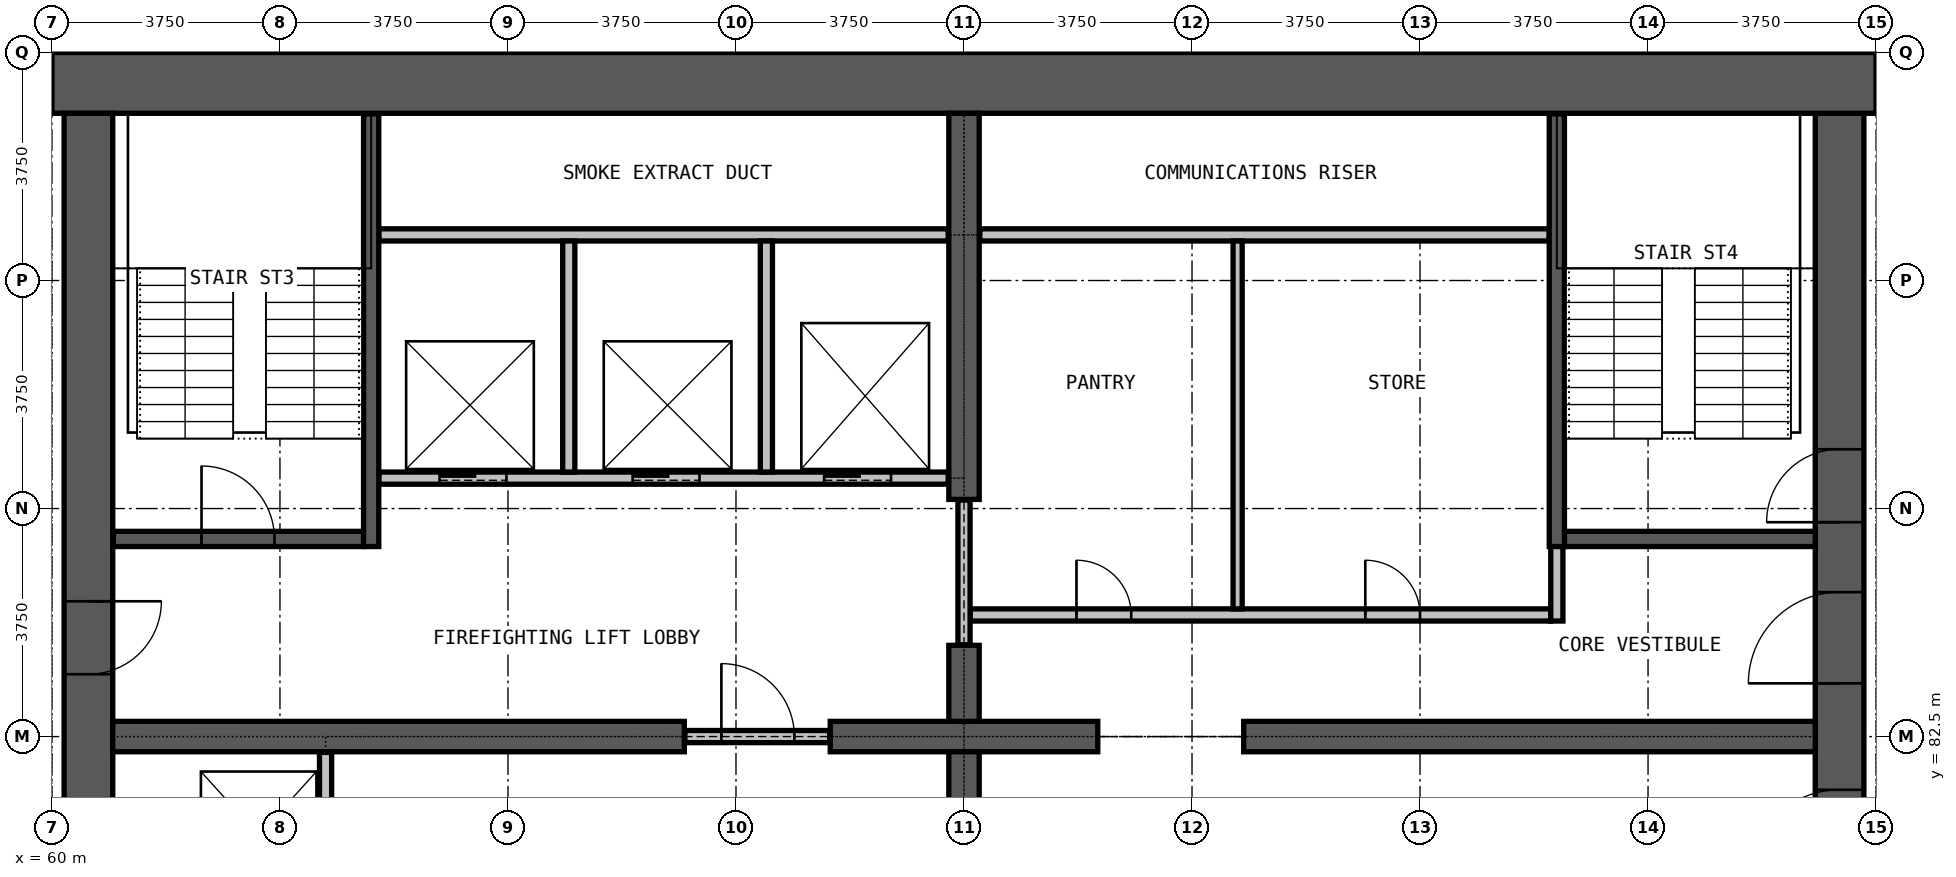
"""IFC4 building model, lengths in metres.
Left out: names, types, materials, properties, quantities, classifications, styles, units other than length and angle.
Written with IfcOpenShell. Run it as: python <this file> out.ifc"""

import sys

from ifc_helpers import new_model, si_unit, direction, frame, frame_2d, origin, place, context, subcontext, project, spatial, rectangle, extrude, element, fill, save


model = new_model("IFC4")
c1 = context("Model", 3, precision=1e-05, world=origin(), true_north=direction((0.0, 1.0)))
c2 = subcontext(c1, "Body", "Model", "MODEL_VIEW")
j1 = project(units=[si_unit("LENGTHUNIT", "METRE"), si_unit("PLANEANGLEUNIT", "RADIAN")], contexts=[c1])
p1 = place(None, origin())
s1 = spatial("IfcSite", under=j1, at=p1, CompositionType="ELEMENT")
p2 = place(p1, origin())
s2 = spatial("IfcBuilding", under=s1, at=p2, CompositionType="ELEMENT")
p3 = place(p2, frame((0.0, 0.0, 136.0)))
s3 = spatial("IfcBuildingStorey", under=s2, at=p3, CompositionType="ELEMENT", Elevation=136.0)
p4 = place(p3, frame((89.4, 72.25, 0.0), z_axis=(0.0, 0.0, 1.0), x_axis=(0.0, 1.0, 0.0)))
e1 = element("IfcWall", 1, at=p4, inside=s3, PredefinedType="SHEAR", context=c2, shape_type="SweptSolid", body=[
    extrude(rectangle(XDim=20.5, YDim=0.8, at=frame_2d((10.25, 0.0))), origin(), (0.0, 0.0, 1.0), 3.6),
])
p5 = place(p4, frame((0.275, 0.0, 0.0)))
e2 = element("IfcOpeningElement", 2, at=p5, cuts=e1, PredefinedType="OPENING", context=c2, shape_type="SweptSolid", body=[
    extrude(rectangle(XDim=1.2, YDim=2.2, at=frame_2d((0.6, 1.1))), frame((0.0, 0.41, 0.0), z_axis=(0.0, -1.0, 0.0), x_axis=(1.0, 0.0, 0.0)), (0.0, 0.0, 1.0), 0.82),
])
p6 = place(p4, frame((13.775, 0.0, 0.0)))
e3 = element("IfcOpeningElement", 3, at=p6, cuts=e1, PredefinedType="OPENING", context=c2, shape_type="SweptSolid", body=[
    extrude(rectangle(XDim=1.2, YDim=2.2, at=frame_2d((0.6, 1.1))), frame((0.0, 0.41, 0.0), z_axis=(0.0, -1.0, 0.0), x_axis=(1.0, 0.0, 0.0)), (0.0, 0.0, 1.0), 0.82),
])
p7 = place(p4, frame((7.875, 0.0, 0.0)))
e4 = element("IfcOpeningElement", 4, at=p7, cuts=e1, PredefinedType="OPENING", context=c2, shape_type="SweptSolid", body=[
    extrude(rectangle(XDim=1.5, YDim=2.2, at=frame_2d((0.75, 1.1))), frame((0.0, 0.41, 0.0), z_axis=(0.0, -1.0, 0.0), x_axis=(1.0, 0.0, 0.0)), (0.0, 0.0, 1.0), 0.82),
])
p8 = place(p4, frame((11.125, 0.0, 0.0)))
e5 = element("IfcOpeningElement", 5, at=p8, cuts=e1, PredefinedType="OPENING", context=c2, shape_type="SweptSolid", body=[
    extrude(rectangle(XDim=1.5, YDim=2.2, at=frame_2d((0.75, 1.1))), frame((0.0, 0.41, 0.0), z_axis=(0.0, -1.0, 0.0), x_axis=(1.0, 0.0, 0.0)), (0.0, 0.0, 1.0), 0.82),
])
p9 = place(p3, frame((90.0, 93.25, 0.0), z_axis=(0.0, 0.0, 1.0), x_axis=(-1.0, 0.0, 0.0)))
e6 = element("IfcWall", 6, at=p9, inside=s3, PredefinedType="SHEAR", context=c2, shape_type="SweptSolid", body=[
    extrude(rectangle(XDim=30.0, YDim=1.0, at=frame_2d((15.0, 0.0))), origin(), (0.0, 0.0, 1.0), 3.6),
])
p10 = place(p3, frame((60.6, 92.75, 0.0), z_axis=(0.0, 0.0, 1.0), x_axis=(0.0, -1.0, 0.0)))
e7 = element("IfcWall", 7, at=p10, inside=s3, PredefinedType="SHEAR", context=c2, shape_type="SweptSolid", body=[
    extrude(rectangle(XDim=20.5, YDim=0.8, at=frame_2d((10.25, 0.0))), origin(), (0.0, 0.0, 1.0), 3.6),
])
p11 = place(p10, frame((19.025, 0.0, 0.0)))
e8 = element("IfcOpeningElement", 8, at=p11, cuts=e7, PredefinedType="OPENING", context=c2, shape_type="SweptSolid", body=[
    extrude(rectangle(XDim=1.2, YDim=2.2, at=frame_2d((0.6, 1.1))), frame((0.0, 0.41, 0.0), z_axis=(0.0, -1.0, 0.0), x_axis=(1.0, 0.0, 0.0)), (0.0, 0.0, 1.0), 0.82),
])
p12 = place(p10, frame((8.025, 0.0, 0.0)))
e9 = element("IfcOpeningElement", 9, at=p12, cuts=e7, PredefinedType="OPENING", context=c2, shape_type="SweptSolid", body=[
    extrude(rectangle(XDim=1.2, YDim=2.2, at=frame_2d((0.6, 1.1))), frame((0.0, 0.41, 0.0), z_axis=(0.0, -1.0, 0.0), x_axis=(1.0, 0.0, 0.0)), (0.0, 0.0, 1.0), 0.82),
])
p13 = place(p3, frame((61.0, 82.5, 0.0), z_axis=(0.0, 0.0, 1.0), x_axis=(1.0, 0.0, 0.0)))
e10 = element("IfcWall", 10, at=p13, inside=s3, PredefinedType="SHEAR", context=c2, shape_type="SweptSolid", body=[
    extrude(rectangle(XDim=9.4, YDim=0.5, at=frame_2d((4.7, 0.0))), origin(), (0.0, 0.0, 1.0), 3.6),
])
p14 = place(p3, frame((72.8, 82.5, 0.0), z_axis=(0.0, 0.0, 1.0), x_axis=(1.0, 0.0, 0.0)))
e11 = element("IfcWall", 11, at=p14, inside=s3, PredefinedType="SHEAR", context=c2, shape_type="SweptSolid", body=[
    extrude(rectangle(XDim=4.4, YDim=0.5, at=frame_2d((2.2, 0.0))), origin(), (0.0, 0.0, 1.0), 3.6),
])
p15 = place(p3, frame((79.6, 82.5, 0.0), z_axis=(0.0, 0.0, 1.0), x_axis=(1.0, 0.0, 0.0)))
e12 = element("IfcWall", 12, at=p15, inside=s3, PredefinedType="SHEAR", context=c2, shape_type="SweptSolid", body=[
    extrude(rectangle(XDim=9.4, YDim=0.5, at=frame_2d((4.7, 0.0))), origin(), (0.0, 0.0, 1.0), 3.6),
])
for number, where, z_axis, x_axis in (
    (13, (75.0, 81.0, 0.0), (0.0, 0.0, 1.0), (0.0, 1.0, 0.0)),
    (14, (75.0, 82.75, 0.0), (0.0, 0.0, 1.0), (0.0, 1.0, 0.0)),
):
    element("IfcWall", number, at=place(p3, frame(where, z_axis=z_axis, x_axis=x_axis)), inside=s3, PredefinedType="SHEAR", context=c2, shape_type="SweptSolid", body=[
        extrude(rectangle(XDim=1.25, YDim=0.5, at=frame_2d((0.625, 0.0))), origin(), (0.0, 0.0, 1.0), 3.6),
    ])
p16 = place(p3, frame((75.0, 86.4, 0.0), z_axis=(0.0, 0.0, 1.0), x_axis=(0.0, 1.0, 0.0)))
e15 = element("IfcWall", 15, at=p16, inside=s3, PredefinedType="SHEAR", context=c2, shape_type="SweptSolid", body=[
    extrude(rectangle(XDim=6.35, YDim=0.5, at=frame_2d((3.175, 0.0))), origin(), (0.0, 0.0, 1.0), 3.6),
])
p17 = place(p3, frame((70.41, 82.5, 0.0), z_axis=(0.0, 0.0, 1.0), x_axis=(1.0, 0.0, 0.0)))
e16 = element("IfcWall", 16, at=p17, inside=s3, PredefinedType="PARTITIONING", context=c2, shape_type="SweptSolid", body=[
    extrude(rectangle(XDim=2.38, YDim=0.2, at=frame_2d((1.19, 0.0))), origin(), (0.0, 0.0, 1.0), 2.4),
])
p18 = place(p17, frame((0.6, 0.0, 0.0)))
e17 = element("IfcOpeningElement", 17, at=p18, cuts=e16, PredefinedType="OPENING", context=c2, shape_type="SweptSolid", body=[
    extrude(rectangle(XDim=1.2, YDim=2.2, at=frame_2d((0.6, 1.1))), frame((0.0, 0.11, 0.0), z_axis=(0.0, -1.0, 0.0), x_axis=(1.0, 0.0, 0.0)), (0.0, 0.0, 1.0), 0.22),
])
p19 = place(p3, frame((75.1, 84.5, 0.0), z_axis=(0.0, 0.0, 1.0), x_axis=(1.0, 0.0, 0.0)))
e18 = element("IfcWall", 18, at=p19, inside=s3, PredefinedType="PARTITIONING", context=c2, shape_type="SweptSolid", body=[
    extrude(rectangle(XDim=9.55, YDim=0.2, at=frame_2d((4.775, 0.0))), origin(), (0.0, 0.0, 1.0), 3.3),
])
p20 = place(p19, frame((1.75, 0.0, 0.0)))
e19 = element("IfcOpeningElement", 19, at=p20, cuts=e18, PredefinedType="OPENING", context=c2, shape_type="SweptSolid", body=[
    extrude(rectangle(XDim=0.9, YDim=2.2, at=frame_2d((0.45, 1.1))), frame((0.0, 0.11, 0.0), z_axis=(0.0, -1.0, 0.0), x_axis=(1.0, 0.0, 0.0)), (0.0, 0.0, 1.0), 0.22),
])
p21 = place(p19, frame((6.5, 0.0, 0.0)))
e20 = element("IfcOpeningElement", 20, at=p21, cuts=e18, PredefinedType="OPENING", context=c2, shape_type="SweptSolid", body=[
    extrude(rectangle(XDim=0.9, YDim=2.2, at=frame_2d((0.45, 1.1))), frame((0.0, 0.11, 0.0), z_axis=(0.0, -1.0, 0.0), x_axis=(1.0, 0.0, 0.0)), (0.0, 0.0, 1.0), 0.22),
])
p22 = place(p3, frame((75.26, 90.75, 0.0), z_axis=(0.0, 0.0, 1.0), x_axis=(1.0, 0.0, 0.0)))
e21 = element("IfcWall", 21, at=p22, inside=s3, PredefinedType="PARTITIONING", context=c2, shape_type="SweptSolid", body=[
    extrude(rectangle(XDim=9.365, YDim=0.2, at=frame_2d((4.683, 0.0))), origin(), (0.0, 0.0, 1.0), 3.3),
])
p23 = place(p3, frame((75.0, 84.01, 0.0), z_axis=(0.0, 0.0, 1.0), x_axis=(0.0, 1.0, 0.0)))
e22 = element("IfcWall", 22, at=p23, inside=s3, PredefinedType="PARTITIONING", context=c2, shape_type="SweptSolid", body=[
    extrude(rectangle(XDim=2.38, YDim=0.2, at=frame_2d((1.19, 0.0))), origin(), (0.0, 0.0, 1.0), 2.4),
])
p24 = place(p3, frame((84.75, 84.4, 0.0), z_axis=(0.0, 0.0, 1.0), x_axis=(0.0, 1.0, 0.0)))
e23 = element("IfcWall", 23, at=p24, inside=s3, PredefinedType="PARTITIONING", context=c2, shape_type="SweptSolid", body=[
    extrude(rectangle(XDim=1.475, YDim=0.2, at=frame_2d((0.738, 0.0))), origin(), (0.0, 0.0, 1.0), 3.3),
])
p25 = place(p3, frame((79.5, 84.6, 0.0), z_axis=(0.0, 0.0, 1.0), x_axis=(0.0, 1.0, 0.0)))
e24 = element("IfcWall", 24, at=p25, inside=s3, PredefinedType="PARTITIONING", context=c2, shape_type="SweptSolid", body=[
    extrude(rectangle(XDim=6.05, YDim=0.15, at=frame_2d((3.025, 0.0))), origin(), (0.0, 0.0, 1.0), 3.3),
])
p26 = place(p3, frame((65.375, 86.75, 0.0), z_axis=(0.0, 0.0, 1.0), x_axis=(1.0, 0.0, 0.0)))
e25 = element("IfcWall", 25, at=p26, inside=s3, PredefinedType="PARTITIONING", context=c2, shape_type="SweptSolid", body=[
    extrude(rectangle(XDim=9.365, YDim=0.2, at=frame_2d((4.683, 0.0))), origin(), (0.0, 0.0, 1.0), 3.3),
])
p27 = place(p26, frame((1.0, 0.0, 0.0)))
e26 = element("IfcOpeningElement", 26, at=p27, cuts=e25, PredefinedType="OPENING", context=c2, shape_type="SweptSolid", body=[
    extrude(rectangle(XDim=1.1, YDim=2.2, at=frame_2d((0.55, 1.1))), frame((0.0, 0.11, 0.0), z_axis=(0.0, -1.0, 0.0), x_axis=(1.0, 0.0, 0.0)), (0.0, 0.0, 1.0), 0.22),
])
p28 = place(p26, frame((4.175, 0.0, 0.0)))
e27 = element("IfcOpeningElement", 27, at=p28, cuts=e25, PredefinedType="OPENING", context=c2, shape_type="SweptSolid", body=[
    extrude(rectangle(XDim=1.1, YDim=2.2, at=frame_2d((0.55, 1.1))), frame((0.0, 0.11, 0.0), z_axis=(0.0, -1.0, 0.0), x_axis=(1.0, 0.0, 0.0)), (0.0, 0.0, 1.0), 0.22),
])
p29 = place(p26, frame((7.325, 0.0, 0.0)))
e28 = element("IfcOpeningElement", 28, at=p29, cuts=e25, PredefinedType="OPENING", context=c2, shape_type="SweptSolid", body=[
    extrude(rectangle(XDim=1.1, YDim=2.2, at=frame_2d((0.55, 1.1))), frame((0.0, 0.11, 0.0), z_axis=(0.0, -1.0, 0.0), x_axis=(1.0, 0.0, 0.0)), (0.0, 0.0, 1.0), 0.22),
])
p30 = place(p3, frame((65.375, 90.75, 0.0), z_axis=(0.0, 0.0, 1.0), x_axis=(1.0, 0.0, 0.0)))
e29 = element("IfcWall", 29, at=p30, inside=s3, PredefinedType="PARTITIONING", context=c2, shape_type="SweptSolid", body=[
    extrude(rectangle(XDim=9.365, YDim=0.2, at=frame_2d((4.683, 0.0))), origin(), (0.0, 0.0, 1.0), 3.3),
])
p31 = place(p3, frame((64.5, 79.375, 0.0), z_axis=(0.0, 0.0, 1.0), x_axis=(0.0, 1.0, 0.0)))
e30 = element("IfcWall", 30, at=p31, inside=s3, PredefinedType="PARTITIONING", context=c2, shape_type="SweptSolid", body=[
    extrude(rectangle(XDim=2.865, YDim=0.2, at=frame_2d((1.433, 0.0))), origin(), (0.0, 0.0, 1.0), 3.3),
])
for number, where, z_axis, x_axis in (
    (31, (68.5, 86.85, 0.0), (0.0, 0.0, 1.0), (0.0, 1.0, 0.0)),
    (32, (71.75, 86.85, 0.0), (0.0, 0.0, 1.0), (0.0, 1.0, 0.0)),
):
    element("IfcWall", number, at=place(p3, frame(where, z_axis=z_axis, x_axis=x_axis)), inside=s3, PredefinedType="PARTITIONING", context=c2, shape_type="SweptSolid", body=[
        extrude(rectangle(XDim=3.8, YDim=0.2, at=frame_2d((1.9, 0.0))), origin(), (0.0, 0.0, 1.0), 3.3),
    ])
p32 = place(p3, frame((61.01, 85.75, 0.0), z_axis=(0.0, 0.0, 1.0), x_axis=(1.0, 0.0, 0.0)))
e33 = element("IfcWall", 33, at=p32, inside=s3, PredefinedType="PARTITIONING", context=c2, shape_type="SweptSolid", body=[
    extrude(rectangle(XDim=4.115, YDim=0.25, at=frame_2d((2.058, 0.0))), origin(), (0.0, 0.0, 1.0), 3.3),
])
p33 = place(p32, frame((1.45, 0.0, 0.0)))
e34 = element("IfcOpeningElement", 34, at=p33, cuts=e33, PredefinedType="OPENING", context=c2, shape_type="SweptSolid", body=[
    extrude(rectangle(XDim=1.2, YDim=2.2, at=frame_2d((0.6, 1.1))), frame((0.0, 0.135, 0.0), z_axis=(0.0, -1.0, 0.0), x_axis=(1.0, 0.0, 0.0)), (0.0, 0.0, 1.0), 0.27),
])
p34 = place(p3, frame((84.875, 85.75, 0.0), z_axis=(0.0, 0.0, 1.0), x_axis=(1.0, 0.0, 0.0)))
e35 = element("IfcWall", 35, at=p34, inside=s3, PredefinedType="PARTITIONING", context=c2, shape_type="SweptSolid", body=[
    extrude(rectangle(XDim=4.125, YDim=0.25, at=frame_2d((2.062, 0.0))), origin(), (0.0, 0.0, 1.0), 3.3),
])
for number, where, z_axis, x_axis in (
    (36, (65.25, 85.625, 0.0), (0.0, 0.0, 1.0), (0.0, 1.0, 0.0)),
    (37, (84.75, 85.625, 0.0), (0.0, 0.0, 1.0), (0.0, 1.0, 0.0)),
):
    element("IfcWall", number, at=place(p3, frame(where, z_axis=z_axis, x_axis=x_axis)), inside=s3, PredefinedType="PARTITIONING", context=c2, shape_type="SweptSolid", body=[
        extrude(rectangle(XDim=7.115, YDim=0.25, at=frame_2d((3.558, 0.0))), origin(), (0.0, 0.0, 1.0), 3.3),
    ])
p35 = place(p27, origin())
e38 = element("IfcDoor", 38, at=p35, inside=s3, OperationType="DOUBLE_DOOR_SLIDING", PredefinedType="DOOR", context=c2, shape_type="SweptSolid", body=[
    extrude(rectangle(XDim=1.1, YDim=2.2, at=frame_2d((0.55, 1.1))), frame((0.0, 0.025, 0.0), z_axis=(0.0, -1.0, 0.0), x_axis=(1.0, 0.0, 0.0)), (0.0, 0.0, 1.0), 0.05),
])
fill(e26, e38)
p36 = place(p28, origin())
e39 = element("IfcDoor", 39, at=p36, inside=s3, OperationType="DOUBLE_DOOR_SLIDING", PredefinedType="DOOR", context=c2, shape_type="SweptSolid", body=[
    extrude(rectangle(XDim=1.1, YDim=2.2, at=frame_2d((0.55, 1.1))), frame((0.0, 0.025, 0.0), z_axis=(0.0, -1.0, 0.0), x_axis=(1.0, 0.0, 0.0)), (0.0, 0.0, 1.0), 0.05),
])
fill(e27, e39)
p37 = place(p29, origin())
e40 = element("IfcDoor", 40, at=p37, inside=s3, OperationType="DOUBLE_DOOR_SLIDING", PredefinedType="DOOR", context=c2, shape_type="SweptSolid", body=[
    extrude(rectangle(XDim=1.1, YDim=2.2, at=frame_2d((0.55, 1.1))), frame((0.0, 0.025, 0.0), z_axis=(0.0, -1.0, 0.0), x_axis=(1.0, 0.0, 0.0)), (0.0, 0.0, 1.0), 0.05),
])
fill(e28, e40)
p38 = place(p18, origin())
e41 = element("IfcDoor", 41, at=p38, inside=s3, OperationType="SINGLE_SWING_LEFT", PredefinedType="DOOR", context=c2, shape_type="SweptSolid", body=[
    extrude(rectangle(XDim=1.2, YDim=2.2, at=frame_2d((0.6, 1.1))), frame((0.0, 0.025, 0.0), z_axis=(0.0, -1.0, 0.0), x_axis=(1.0, 0.0, 0.0)), (0.0, 0.0, 1.0), 0.05),
])
fill(e17, e41)
p39 = place(p33, origin())
e42 = element("IfcDoor", 42, at=p39, inside=s3, OperationType="SINGLE_SWING_LEFT", PredefinedType="DOOR", context=c2, shape_type="SweptSolid", body=[
    extrude(rectangle(XDim=1.2, YDim=2.2, at=frame_2d((0.6, 1.1))), frame((0.0, 0.025, 0.0), z_axis=(0.0, -1.0, 0.0), x_axis=(1.0, 0.0, 0.0)), (0.0, 0.0, 1.0), 0.05),
])
fill(e34, e42)
p40 = place(p6, origin())
e43 = element("IfcDoor", 43, at=p40, inside=s3, OperationType="SINGLE_SWING_RIGHT", PredefinedType="DOOR", context=c2, shape_type="SweptSolid", body=[
    extrude(rectangle(XDim=1.2, YDim=2.2, at=frame_2d((0.6, 1.1))), frame((0.0, 0.025, 0.0), z_axis=(0.0, -1.0, 0.0), x_axis=(1.0, 0.0, 0.0)), (0.0, 0.0, 1.0), 0.05),
])
fill(e3, e43)
p41 = place(p7, origin())
e44 = element("IfcDoor", 44, at=p41, inside=s3, OperationType="DOUBLE_DOOR_SINGLE_SWING", PredefinedType="DOOR", context=c2, shape_type="SweptSolid", body=[
    extrude(rectangle(XDim=1.5, YDim=2.2, at=frame_2d((0.75, 1.1))), frame((0.0, 0.025, 0.0), z_axis=(0.0, -1.0, 0.0), x_axis=(1.0, 0.0, 0.0)), (0.0, 0.0, 1.0), 0.05),
])
fill(e4, e44)
p42 = place(p12, origin())
e45 = element("IfcDoor", 45, at=p42, inside=s3, OperationType="SINGLE_SWING_RIGHT", PredefinedType="DOOR", context=c2, shape_type="SweptSolid", body=[
    extrude(rectangle(XDim=1.2, YDim=2.2, at=frame_2d((0.6, 1.1))), frame((0.0, 0.025, 0.0), z_axis=(0.0, -1.0, 0.0), x_axis=(1.0, 0.0, 0.0)), (0.0, 0.0, 1.0), 0.05),
])
fill(e9, e45)
p43 = place(p8, origin())
e46 = element("IfcDoor", 46, at=p43, inside=s3, OperationType="DOUBLE_DOOR_SINGLE_SWING", PredefinedType="DOOR", context=c2, shape_type="SweptSolid", body=[
    extrude(rectangle(XDim=1.5, YDim=2.2, at=frame_2d((0.75, 1.1))), frame((0.0, 0.025, 0.0), z_axis=(0.0, -1.0, 0.0), x_axis=(1.0, 0.0, 0.0)), (0.0, 0.0, 1.0), 0.05),
])
fill(e5, e46)
p44 = place(p20, origin())
e47 = element("IfcDoor", 47, at=p44, inside=s3, OperationType="SINGLE_SWING_LEFT", PredefinedType="DOOR", context=c2, shape_type="SweptSolid", body=[
    extrude(rectangle(XDim=0.9, YDim=2.2, at=frame_2d((0.45, 1.1))), frame((0.0, 0.025, 0.0), z_axis=(0.0, -1.0, 0.0), x_axis=(1.0, 0.0, 0.0)), (0.0, 0.0, 1.0), 0.05),
])
fill(e19, e47)
p45 = place(p21, origin())
e48 = element("IfcDoor", 48, at=p45, inside=s3, OperationType="SINGLE_SWING_LEFT", PredefinedType="DOOR", context=c2, shape_type="SweptSolid", body=[
    extrude(rectangle(XDim=0.9, YDim=2.2, at=frame_2d((0.45, 1.1))), frame((0.0, 0.025, 0.0), z_axis=(0.0, -1.0, 0.0), x_axis=(1.0, 0.0, 0.0)), (0.0, 0.0, 1.0), 0.05),
])
fill(e20, e48)
save(model, sys.argv[1])
